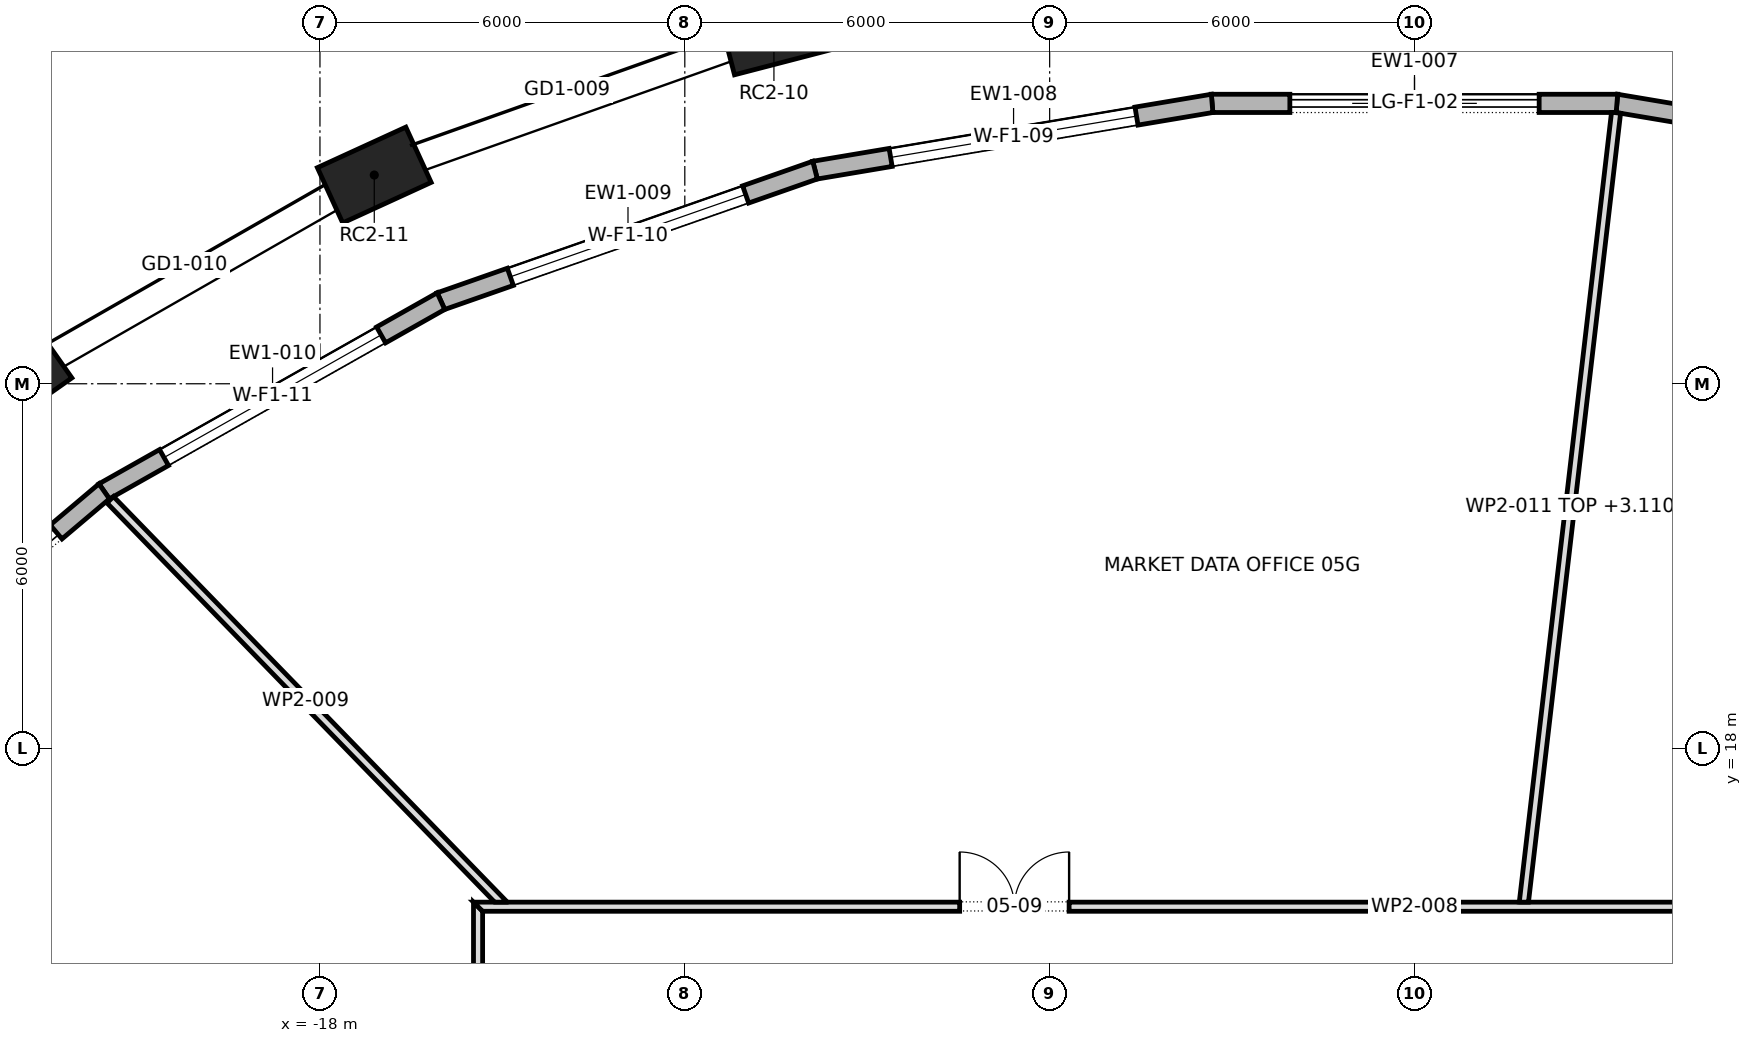
"""IFC4 building model, lengths in metres.
Left out: names, types, materials, properties, quantities, classifications, styles, units other than length and angle.
Written with IfcOpenShell. Run it as: python <this file> out.ifc"""

import sys

from ifc_helpers import new_model, si_unit, direction, frame, frame_2d, origin, origin_2d, place, context, subcontext, project, spatial, polyline, rectangle, outline, extrude, element, fill, save


model = new_model("IFC4")
c1 = context("Model", 3, precision=1e-05, world=origin(), true_north=direction((0.0, 1.0)))
c2 = subcontext(c1, "Body", "Model", "MODEL_VIEW")
j1 = project(units=[si_unit("LENGTHUNIT", "METRE"), si_unit("PLANEANGLEUNIT", "RADIAN")], contexts=[c1])
p1 = place(None, origin())
s1 = spatial("IfcSite", under=j1, at=p1, CompositionType="ELEMENT")
p2 = place(p1, origin())
s2 = spatial("IfcBuilding", under=s1, at=p2, CompositionType="ELEMENT")
p3 = place(p2, frame((0.0, 0.0, 82.3)))
s3 = spatial("IfcBuildingStorey", under=s2, at=p3, CompositionType="ELEMENT", Elevation=82.3)
for number, where, z_axis, x_axis in (
    (1, (-10.534, 29.766, 0.0), (0.0, 0.0, 1.0), (-0.968, -0.252, 0.0)),
    (2, (-17.107, 27.432, 0.0), (0.0, 0.0, 1.0), (-0.909, -0.417, 0.0)),
    (3, (-23.022, 24.045, 0.0), (0.0, 0.0, 1.0), (-0.818, -0.575, 0.0)),
):
    element("IfcColumn", number, at=place(p3, frame(where, z_axis=z_axis, x_axis=x_axis)), inside=s3, PredefinedType="COLUMN", context=c2, shape_type="SweptSolid", body=[
        extrude(rectangle(XDim=1.6, YDim=1.0, at=origin_2d()), origin(), (0.0, 0.0, 1.0), 4.2),
    ])
p4 = place(p3, frame((9.858, 27.513, 0.0), z_axis=(0.0, 0.0, 1.0), x_axis=(-0.986157735925, 0.165809890767, 0.0)))
e4 = element("IfcWall", 4, at=p4, inside=s3, PredefinedType="STANDARD", context=c2, shape_type="SweptSolid", body=[
    extrude(outline(polyline([(-0.013, -0.15), (6.634, -0.15), (6.609, 0.15), (0.013, 0.15), (-0.013, -0.15)])), origin(), (0.0, 0.0, 1.0), 3.9),
])
p5 = place(p4, frame((1.261, 0.0, 0.6)))
e5 = element("IfcOpeningElement", 5, at=p5, cuts=e4, PredefinedType="OPENING", context=c2, shape_type="SweptSolid", body=[
    extrude(rectangle(XDim=4.1, YDim=2.85, at=frame_2d((2.05, 1.425))), frame((0.0, 0.162, 0.0), z_axis=(0.0, -1.0, 0.0), x_axis=(1.0, 0.0, 0.0)), (0.0, 0.0, 1.0), 0.324),
])
p6 = place(p3, frame((3.329, 28.611, 0.0), z_axis=(0.0, 0.0, 1.0), x_axis=(-1.0, 0.0, 0.0)))
e6 = element("IfcWall", 6, at=p6, inside=s3, PredefinedType="STANDARD", context=c2, shape_type="SweptSolid", body=[
    extrude(outline(polyline([(-0.012, -0.15), (6.67, -0.15), (6.645, 0.15), (0.012, 0.15), (-0.012, -0.15)])), origin(), (0.0, 0.0, 1.0), 3.9),
])
p7 = place(p6, frame((1.279, 0.0, 0.0)))
e7 = element("IfcOpeningElement", 7, at=p7, cuts=e6, PredefinedType="OPENING", context=c2, shape_type="SweptSolid", body=[
    extrude(rectangle(XDim=4.1, YDim=3.45, at=frame_2d((2.05, 1.725))), frame((0.0, 0.162, 0.0), z_axis=(0.0, -1.0, 0.0), x_axis=(1.0, 0.0, 0.0)), (0.0, 0.0, 1.0), 0.324),
])
p8 = place(p3, frame((-3.329, 28.611, 0.0), z_axis=(0.0, 0.0, 1.0), x_axis=(-0.986157735925, -0.165809890767, 0.0)))
e8 = element("IfcWall", 8, at=p8, inside=s3, PredefinedType="STANDARD", context=c2, shape_type="SweptSolid", body=[
    extrude(outline(polyline([(-0.012, -0.15), (6.634, -0.15), (6.609, 0.15), (0.012, 0.15), (-0.012, -0.15)])), origin(), (0.0, 0.0, 1.0), 3.9),
])
p9 = place(p8, frame((1.261, 0.0, 0.6)))
e9 = element("IfcOpeningElement", 9, at=p9, cuts=e8, PredefinedType="OPENING", context=c2, shape_type="SweptSolid", body=[
    extrude(rectangle(XDim=4.1, YDim=2.85, at=frame_2d((2.05, 1.425))), frame((0.0, 0.162, 0.0), z_axis=(0.0, -1.0, 0.0), x_axis=(1.0, 0.0, 0.0)), (0.0, 0.0, 1.0), 0.324),
])
p10 = place(p3, frame((-9.858, 27.513, 0.0), z_axis=(0.0, 0.0, 1.0), x_axis=(-0.943815136299, -0.330473884736, 0.0)))
e10 = element("IfcWall", 10, at=p10, inside=s3, PredefinedType="STANDARD", context=c2, shape_type="SweptSolid", body=[
    extrude(outline(polyline([(-0.013, -0.15), (6.531, -0.15), (6.505, 0.15), (0.013, 0.15), (-0.013, -0.15)])), origin(), (0.0, 0.0, 1.0), 3.9),
])
p11 = place(p10, frame((1.209, 0.0, 0.6)))
e11 = element("IfcOpeningElement", 11, at=p11, cuts=e10, PredefinedType="OPENING", context=c2, shape_type="SweptSolid", body=[
    extrude(rectangle(XDim=4.1, YDim=2.85, at=frame_2d((2.05, 1.425))), frame((0.0, 0.162, 0.0), z_axis=(0.0, -1.0, 0.0), x_axis=(1.0, 0.0, 0.0)), (0.0, 0.0, 1.0), 0.324),
])
p12 = place(p3, frame((-16.01, 25.359, 0.0), z_axis=(0.0, 0.0, 1.0), x_axis=(-0.870710061474, -0.491796694629, 0.0)))
e12 = element("IfcWall", 12, at=p12, inside=s3, PredefinedType="STANDARD", context=c2, shape_type="SweptSolid", body=[
    extrude(outline(polyline([(-0.013, -0.15), (6.375, -0.15), (6.346, 0.15), (0.013, 0.15), (-0.013, -0.15)])), origin(), (0.0, 0.0, 1.0), 3.9),
])
p13 = place(p12, frame((1.13, 0.0, 0.6)))
e13 = element("IfcOpeningElement", 13, at=p13, cuts=e12, PredefinedType="OPENING", context=c2, shape_type="SweptSolid", body=[
    extrude(rectangle(XDim=4.1, YDim=2.85, at=frame_2d((2.05, 1.425))), frame((0.0, 0.162, 0.0), z_axis=(0.0, -1.0, 0.0), x_axis=(1.0, 0.0, 0.0)), (0.0, 0.0, 1.0), 0.324),
])
p14 = place(p3, frame((-21.549, 22.231, 0.0), z_axis=(0.0, 0.0, 1.0), x_axis=(-0.763693886759, -0.645578536916, 0.0)))
e14 = element("IfcWall", 14, at=p14, inside=s3, PredefinedType="STANDARD", context=c2, shape_type="SweptSolid", body=[
    extrude(outline(polyline([(-0.014, -0.15), (6.185, -0.15), (6.155, 0.15), (0.014, 0.15), (-0.014, -0.15)])), origin(), (0.0, 0.0, 1.0), 3.9),
])
p15 = place(p14, frame((1.035, 0.0, 0.0)))
e15 = element("IfcOpeningElement", 15, at=p15, cuts=e14, PredefinedType="OPENING", context=c2, shape_type="SweptSolid", body=[
    extrude(rectangle(XDim=4.1, YDim=3.45, at=frame_2d((2.05, 1.725))), frame((0.0, 0.162, 0.0), z_axis=(0.0, -1.0, 0.0), x_axis=(1.0, 0.0, 0.0)), (0.0, 0.0, 1.0), 0.324),
])
p16 = place(p3, frame((-15.4, -15.475, 0.0), z_axis=(0.0, 0.0, 1.0), x_axis=(0.0, 1.0, 0.0)))
e16 = element("IfcWall", 16, at=p16, inside=s3, PredefinedType="PARTITIONING", context=c2, shape_type="SweptSolid", body=[
    extrude(outline(polyline([(0.15, -0.075), (2.066, -0.075), (3.981, -0.075), (5.897, -0.075), (7.812, -0.075), (9.728, -0.075), (11.644, -0.075), (13.56, -0.075), (15.475, -0.075), (17.391, -0.075), (19.306, -0.075), (21.222, -0.075), (23.138, -0.075), (25.053, -0.075), (26.969, -0.075), (28.885, -0.075), (30.8, -0.075), (30.95, 0.075), (29.016, 0.075), (27.081, 0.075), (25.147, 0.075), (23.212, 0.075), (21.278, 0.075), (19.344, 0.075), (17.409, 0.075), (15.475, 0.075), (13.541, 0.075), (11.606, 0.075), (9.672, 0.075), (7.738, 0.075), (5.803, 0.075), (3.869, 0.075), (1.935, 0.075), (0.0, 0.075), (0.15, -0.075)])), origin(), (0.0, 0.0, 1.0), 3.9),
])
p17 = place(p16, frame((10.275, 0.0, 0.0)))
e17 = element("IfcOpeningElement", 17, at=p17, cuts=e16, PredefinedType="OPENING", context=c2, shape_type="SweptSolid", body=[
    extrude(rectangle(XDim=1.0, YDim=2.1, at=frame_2d((0.5, 1.05))), frame((0.0, 0.087, 0.0), z_axis=(0.0, -1.0, 0.0), x_axis=(1.0, 0.0, 0.0)), (0.0, 0.0, 1.0), 0.174),
])
p18 = place(p16, frame((22.915, 0.0, 0.0)))
e18 = element("IfcOpeningElement", 18, at=p18, cuts=e16, PredefinedType="OPENING", context=c2, shape_type="SweptSolid", body=[
    extrude(rectangle(XDim=1.8, YDim=2.1, at=frame_2d((0.9, 1.05))), frame((0.0, 0.087, 0.0), z_axis=(0.0, -1.0, 0.0), x_axis=(1.0, 0.0, 0.0)), (0.0, 0.0, 1.0), 0.174),
])
p19 = place(p3, frame((-15.475, 15.4, 0.0), z_axis=(0.0, 0.0, 1.0), x_axis=(1.0, 0.0, 0.0)))
e19 = element("IfcWall", 19, at=p19, inside=s3, PredefinedType="PARTITIONING", context=c2, shape_type="SweptSolid", body=[
    extrude(outline(polyline([(0.15, -0.075), (2.066, -0.075), (3.981, -0.075), (5.897, -0.075), (7.812, -0.075), (9.728, -0.075), (11.644, -0.075), (13.56, -0.075), (15.475, -0.075), (17.391, -0.075), (19.306, -0.075), (21.222, -0.075), (23.138, -0.075), (25.053, -0.075), (26.969, -0.075), (28.885, -0.075), (30.8, -0.075), (30.95, 0.075), (29.016, 0.075), (27.081, 0.075), (25.147, 0.075), (23.212, 0.075), (21.278, 0.075), (19.344, 0.075), (17.409, 0.075), (15.475, 0.075), (13.541, 0.075), (11.606, 0.075), (9.672, 0.075), (7.738, 0.075), (5.803, 0.075), (3.869, 0.075), (1.935, 0.075), (0.0, 0.075), (0.15, -0.075)])), origin(), (0.0, 0.0, 1.0), 3.9),
])
p20 = place(p19, frame((26.573, 0.0, 0.0)))
e20 = element("IfcOpeningElement", 20, at=p20, cuts=e19, PredefinedType="OPENING", context=c2, shape_type="SweptSolid", body=[
    extrude(rectangle(XDim=1.8, YDim=2.1, at=frame_2d((0.9, 1.05))), frame((0.0, 0.087, 0.0), z_axis=(0.0, -1.0, 0.0), x_axis=(1.0, 0.0, 0.0)), (0.0, 0.0, 1.0), 0.174),
])
p21 = place(p19, frame((19.768, 0.0, 0.0)))
e21 = element("IfcOpeningElement", 21, at=p21, cuts=e19, PredefinedType="OPENING", context=c2, shape_type="SweptSolid", body=[
    extrude(rectangle(XDim=1.8, YDim=2.1, at=frame_2d((0.9, 1.05))), frame((0.0, 0.087, 0.0), z_axis=(0.0, -1.0, 0.0), x_axis=(1.0, 0.0, 0.0)), (0.0, 0.0, 1.0), 0.174),
])
p22 = place(p19, frame((7.995, 0.0, 0.0)))
e22 = element("IfcOpeningElement", 22, at=p22, cuts=e19, PredefinedType="OPENING", context=c2, shape_type="SweptSolid", body=[
    extrude(rectangle(XDim=1.8, YDim=2.1, at=frame_2d((0.9, 1.05))), frame((0.0, 0.087, 0.0), z_axis=(0.0, -1.0, 0.0), x_axis=(1.0, 0.0, 0.0)), (0.0, 0.0, 1.0), 0.174),
])
p23 = place(p3, frame((-14.972, 15.423, 0.0), z_axis=(0.0, 0.0, 1.0), x_axis=(-0.696670635557, 0.717391124529, 0.0)))
e23 = element("IfcWall", 23, at=p23, inside=s3, PredefinedType="PARTITIONING", context=c2, shape_type="SweptSolid", body=[
    extrude(outline(polyline([(9.296, 0.075), (7.466, 0.075), (5.636, 0.075), (3.806, 0.075), (1.975, 0.075), (0.145, 0.075), (0.0, -0.074), (0.0, -0.075), (1.859, -0.075), (3.719, -0.075), (5.578, -0.075), (7.437, -0.075), (9.296, -0.075), (9.296, 0.075)])), origin(), (0.0, 0.0, 1.0), 3.9),
])
p24 = place(p3, frame((1.798, 15.467, 0.0), z_axis=(0.0, 0.0, 1.0), x_axis=(0.115980148961, 0.993251531611, 0.0)))
e24 = element("IfcWall", 24, at=p24, inside=s3, PredefinedType="PARTITIONING", context=c2, shape_type="SweptSolid", body=[
    extrude(outline(polyline([(13.079, -0.075), (13.079, 0.034), (13.074, 0.075), (11.206, 0.075), (9.338, 0.075), (7.471, 0.075), (5.603, 0.075), (3.735, 0.075), (1.868, 0.075), (0.0, 0.075), (0.0, 0.073), (0.017, -0.075), (1.883, -0.075), (3.749, -0.075), (5.615, -0.075), (7.481, -0.075), (9.347, -0.075), (11.213, -0.075), (13.079, -0.075)])), origin(), (0.0, 0.0, 1.0), 3.11),
])
p25 = place(p7, origin())
e25 = element("IfcDoor", 25, at=p25, inside=s3, OperationType="DOUBLE_DOOR_SLIDING", PredefinedType="DOOR", context=c2, shape_type="SweptSolid", body=[
    extrude(rectangle(XDim=4.1, YDim=3.45, at=frame_2d((2.05, 1.725))), frame((0.0, 0.025, 0.0), z_axis=(0.0, -1.0, 0.0), x_axis=(1.0, 0.0, 0.0)), (0.0, 0.0, 1.0), 0.05),
])
fill(e7, e25)
p26 = place(p9, origin())
e26 = element("IfcWindow", 26, at=p26, inside=s3, PartitioningType="TRIPLE_PANEL_VERTICAL", PredefinedType="WINDOW", context=c2, shape_type="SweptSolid", body=[
    extrude(rectangle(XDim=4.1, YDim=2.85, at=frame_2d((2.05, 1.425))), frame((0.0, 0.03, 0.0), z_axis=(0.0, -1.0, 0.0), x_axis=(1.0, 0.0, 0.0)), (0.0, 0.0, 1.0), 0.06),
])
fill(e9, e26)
p27 = place(p11, origin())
e27 = element("IfcWindow", 27, at=p27, inside=s3, PartitioningType="TRIPLE_PANEL_VERTICAL", PredefinedType="WINDOW", context=c2, shape_type="SweptSolid", body=[
    extrude(rectangle(XDim=4.1, YDim=2.85, at=frame_2d((2.05, 1.425))), frame((0.0, 0.03, 0.0), z_axis=(0.0, -1.0, 0.0), x_axis=(1.0, 0.0, 0.0)), (0.0, 0.0, 1.0), 0.06),
])
fill(e11, e27)
p28 = place(p13, origin())
e28 = element("IfcWindow", 28, at=p28, inside=s3, PartitioningType="TRIPLE_PANEL_VERTICAL", PredefinedType="WINDOW", context=c2, shape_type="SweptSolid", body=[
    extrude(rectangle(XDim=4.1, YDim=2.85, at=frame_2d((2.05, 1.425))), frame((0.0, 0.03, 0.0), z_axis=(0.0, -1.0, 0.0), x_axis=(1.0, 0.0, 0.0)), (0.0, 0.0, 1.0), 0.06),
])
fill(e13, e28)
p29 = place(p15, origin())
e29 = element("IfcDoor", 29, at=p29, inside=s3, OperationType="DOUBLE_DOOR_SLIDING", PredefinedType="DOOR", context=c2, shape_type="SweptSolid", body=[
    extrude(rectangle(XDim=4.1, YDim=3.45, at=frame_2d((2.05, 1.725))), frame((0.0, 0.025, 0.0), z_axis=(0.0, -1.0, 0.0), x_axis=(1.0, 0.0, 0.0)), (0.0, 0.0, 1.0), 0.05),
])
fill(e15, e29)
p30 = place(p22, origin())
e30 = element("IfcDoor", 30, at=p30, inside=s3, OperationType="DOUBLE_DOOR_SINGLE_SWING", PredefinedType="DOOR", context=c2, shape_type="SweptSolid", body=[
    extrude(rectangle(XDim=1.8, YDim=2.1, at=frame_2d((0.9, 1.05))), frame((0.0, 0.025, 0.0), z_axis=(0.0, -1.0, 0.0), x_axis=(1.0, 0.0, 0.0)), (0.0, 0.0, 1.0), 0.05),
])
fill(e22, e30)
save(model, sys.argv[1])
